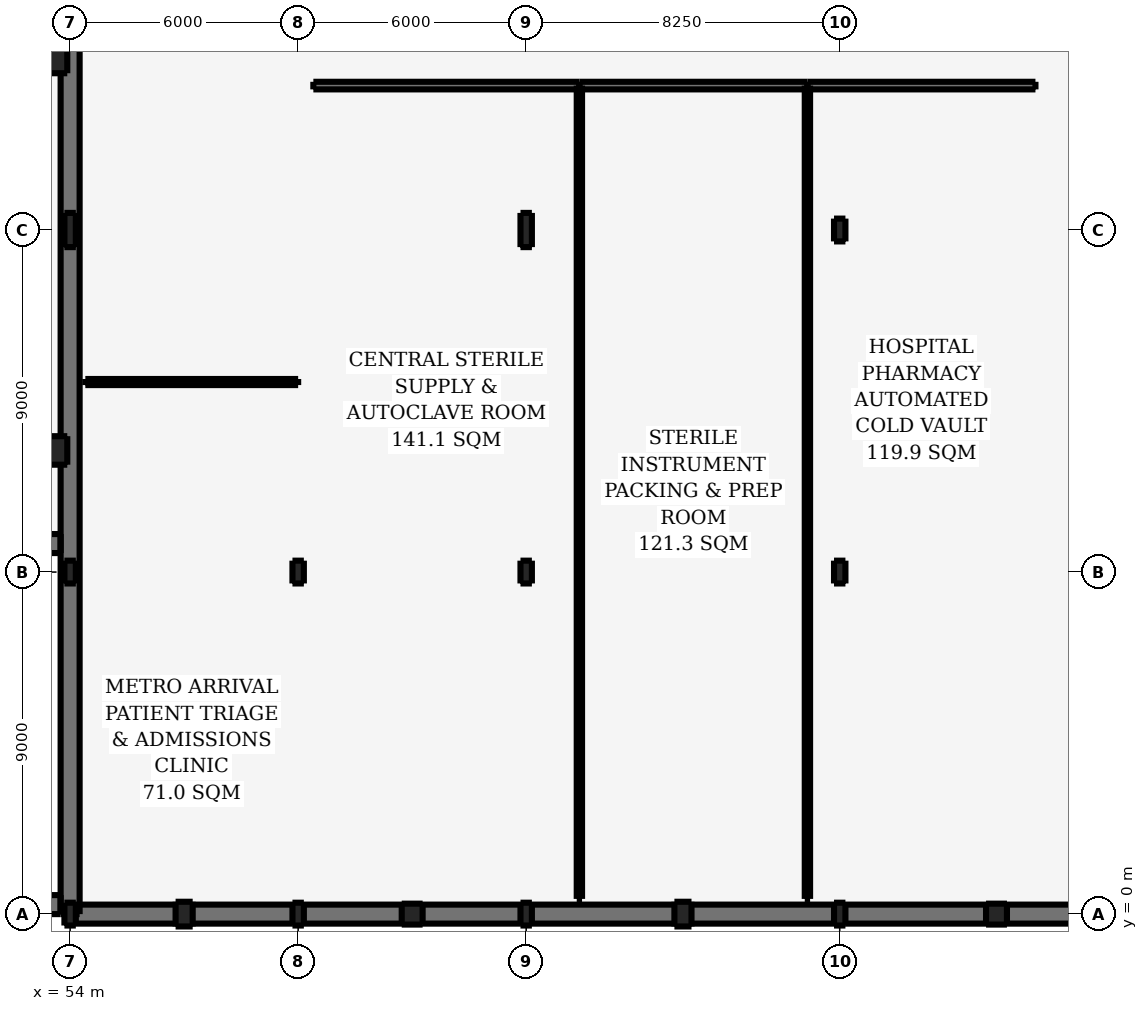
"""IFC4 building model, lengths in metres.
Left out: names, types, materials, properties, quantities, classifications, styles, units other than length and angle.
Written with IfcOpenShell. Run it as: python <this file> out.ifc"""

import sys

from ifc_helpers import new_model, si_unit, direction, frame, frame_2d, origin, origin_2d, place, context, subcontext, project, spatial, rectangle, i_section, extrude, element, fill, save


model = new_model("IFC4")
c1 = context("Model", 3, precision=1e-05, world=origin(), true_north=direction((0.0, 1.0)))
c2 = subcontext(c1, "Body", "Model", "MODEL_VIEW")
j1 = project(units=[si_unit("LENGTHUNIT", "METRE"), si_unit("PLANEANGLEUNIT", "RADIAN")], contexts=[c1])
p1 = place(None, origin())
s1 = spatial("IfcSite", under=j1, at=p1, CompositionType="ELEMENT")
p2 = place(p1, origin())
s2 = spatial("IfcBuilding", under=s1, at=p2, CompositionType="ELEMENT")
p3 = place(p2, frame((0.0, 0.0, -4.8)))
s3 = spatial("IfcBuildingStorey", under=s2, at=p3, CompositionType="ELEMENT", Elevation=-4.8)
for number, where, z_axis, x_axis in (
    (1, (53.55, 12.2, 0.0), (0.0, 0.0, 1.0), (1.0, 0.0, 0.0)),
    (2, (53.55, 22.5, 0.0), (0.0, 0.0, 1.0), (1.0, 0.0, 0.0)),
):
    element("IfcColumn", number, at=place(p3, frame(where, z_axis=z_axis, x_axis=x_axis)), inside=s3, PredefinedType="PILASTER", context=c2, shape_type="SweptSolid", body=[
        extrude(rectangle(XDim=0.75, YDim=0.75, at=origin_2d()), origin(), (0.0, 0.0, 1.0), 4.8),
    ])
for number, where, z_axis, x_axis in (
    (3, (54.0, 0.0, 0.0), (0.0, 0.0, 1.0), (1.0, 0.0, 0.0)),
    (4, (54.0, 9.0, 0.0), (0.0, 0.0, 1.0), (1.0, 0.0, 0.0)),
):
    element("IfcColumn", number, at=place(p3, frame(where, z_axis=z_axis, x_axis=x_axis)), inside=s3, PredefinedType="COLUMN", context=c2, shape_type="SweptSolid", body=[
        extrude(i_section(OverallWidth=0.3, OverallDepth=0.6, WebThickness=0.015, FlangeThickness=0.03, FilletRadius=0.027, at=origin_2d()), origin(), (0.0, 0.0, 1.0), 4.8),
    ])
p4 = place(p3, frame((54.0, 18.0, 0.0), z_axis=(0.0, 0.0, 1.0), x_axis=(1.0, 0.0, 0.0)))
e5 = element("IfcColumn", 5, at=p4, inside=s3, PredefinedType="COLUMN", context=c2, shape_type="SweptSolid", body=[
    extrude(i_section(OverallWidth=0.3, OverallDepth=0.9, WebThickness=0.019, FlangeThickness=0.035, FilletRadius=0.03, at=origin_2d()), origin(), (0.0, 0.0, 1.0), 4.8),
])
p5 = place(p3, frame((57.0, 0.0, 0.0), z_axis=(0.0, 0.0, 1.0), x_axis=(1.0, 0.0, 0.0)))
e6 = element("IfcColumn", 6, at=p5, inside=s3, PredefinedType="PILASTER", context=c2, shape_type="SweptSolid", body=[
    extrude(rectangle(XDim=0.45, YDim=0.65, at=origin_2d()), origin(), (0.0, 0.0, 1.0), 4.8),
])
for number, where, z_axis, x_axis in (
    (7, (60.0, 0.0, 0.0), (0.0, 0.0, 1.0), (1.0, 0.0, 0.0)),
    (8, (60.0, 9.0, 0.0), (0.0, 0.0, 1.0), (1.0, 0.0, 0.0)),
):
    element("IfcColumn", number, at=place(p3, frame(where, z_axis=z_axis, x_axis=x_axis)), inside=s3, PredefinedType="COLUMN", context=c2, shape_type="SweptSolid", body=[
        extrude(i_section(OverallWidth=0.3, OverallDepth=0.6, WebThickness=0.015, FlangeThickness=0.03, FilletRadius=0.027, at=origin_2d()), origin(), (0.0, 0.0, 1.0), 4.8),
    ])
p6 = place(p3, frame((63.0, 0.0, 0.0), z_axis=(0.0, 0.0, 1.0), x_axis=(1.0, 0.0, 0.0)))
e9 = element("IfcColumn", 9, at=p6, inside=s3, PredefinedType="PILASTER", context=c2, shape_type="SweptSolid", body=[
    extrude(rectangle(XDim=0.55, YDim=0.55, at=origin_2d()), origin(), (0.0, 0.0, 1.0), 4.8),
])
for number, where, z_axis, x_axis in (
    (10, (66.0, 0.0, 0.0), (0.0, 0.0, 1.0), (1.0, 0.0, 0.0)),
    (11, (66.0, 9.0, 0.0), (0.0, 0.0, 1.0), (1.0, 0.0, 0.0)),
):
    element("IfcColumn", number, at=place(p3, frame(where, z_axis=z_axis, x_axis=x_axis)), inside=s3, PredefinedType="COLUMN", context=c2, shape_type="SweptSolid", body=[
        extrude(i_section(OverallWidth=0.3, OverallDepth=0.6, WebThickness=0.015, FlangeThickness=0.03, FilletRadius=0.027, at=origin_2d()), origin(), (0.0, 0.0, 1.0), 4.8),
    ])
p7 = place(p3, frame((66.0, 18.0, 0.0), z_axis=(0.0, 0.0, 1.0), x_axis=(1.0, 0.0, 0.0)))
e12 = element("IfcColumn", 12, at=p7, inside=s3, PredefinedType="COLUMN", context=c2, shape_type="SweptSolid", body=[
    extrude(i_section(OverallWidth=0.3, OverallDepth=0.9, WebThickness=0.019, FlangeThickness=0.035, FilletRadius=0.03, at=origin_2d()), origin(), (0.0, 0.0, 1.0), 4.8),
])
p8 = place(p3, frame((70.125, 0.0, 0.0), z_axis=(0.0, 0.0, 1.0), x_axis=(1.0, 0.0, 0.0)))
e13 = element("IfcColumn", 13, at=p8, inside=s3, PredefinedType="PILASTER", context=c2, shape_type="SweptSolid", body=[
    extrude(rectangle(XDim=0.45, YDim=0.65, at=origin_2d()), origin(), (0.0, 0.0, 1.0), 4.8),
])
for number, where, z_axis, x_axis in (
    (14, (74.25, 0.0, 0.0), (0.0, 0.0, 1.0), (1.0, 0.0, 0.0)),
    (15, (74.25, 9.0, 0.0), (0.0, 0.0, 1.0), (1.0, 0.0, 0.0)),
    (16, (74.25, 18.0, 0.0), (0.0, 0.0, 1.0), (1.0, 0.0, 0.0)),
):
    element("IfcColumn", number, at=place(p3, frame(where, z_axis=z_axis, x_axis=x_axis)), inside=s3, PredefinedType="COLUMN", context=c2, shape_type="SweptSolid", body=[
        extrude(i_section(OverallWidth=0.3, OverallDepth=0.6, WebThickness=0.015, FlangeThickness=0.03, FilletRadius=0.027, at=origin_2d()), origin(), (0.0, 0.0, 1.0), 4.8),
    ])
p9 = place(p3, frame((78.375, 0.0, 0.0), z_axis=(0.0, 0.0, 1.0), x_axis=(1.0, 0.0, 0.0)))
e17 = element("IfcColumn", 17, at=p9, inside=s3, PredefinedType="PILASTER", context=c2, shape_type="SweptSolid", body=[
    extrude(rectangle(XDim=0.55, YDim=0.55, at=origin_2d()), origin(), (0.0, 0.0, 1.0), 4.8),
])
p10 = place(p3, frame((54.0, 0.0, 0.0), z_axis=(0.0, 0.0, 1.0), x_axis=(0.0, 1.0, 0.0)))
e18 = element("IfcWall", 18, at=p10, inside=s3, PredefinedType="SOLIDWALL", context=c2, shape_type="SweptSolid", body=[
    extrude(rectangle(XDim=36.0, YDim=0.5, at=frame_2d((18.0, 0.0))), origin(), (0.0, 0.0, 1.0), 4.5),
])
p11 = place(p10, frame((23.5, 0.0, 0.0)))
e19 = element("IfcOpeningElement", 19, at=p11, cuts=e18, PredefinedType="OPENING", context=c2, shape_type="SweptSolid", body=[
    extrude(rectangle(XDim=2.6, YDim=2.6, at=frame_2d((1.3, 1.3))), frame((0.0, 0.26, 0.0), z_axis=(0.0, -1.0, 0.0), x_axis=(1.0, 0.0, 0.0)), (0.0, 0.0, 1.0), 0.52),
])
p12 = place(p3, frame((99.0, 0.0, 0.0), z_axis=(0.0, 0.0, 1.0), x_axis=(-1.0, 0.0, 0.0)))
e20 = element("IfcWall", 20, at=p12, inside=s3, PredefinedType="SOLIDWALL", context=c2, shape_type="SweptSolid", body=[
    extrude(rectangle(XDim=45.0, YDim=0.5, at=frame_2d((22.5, 0.0))), origin(), (0.0, 0.0, 1.0), 4.5),
])
p13 = place(p3, frame((0.0, 0.25, 0.0), z_axis=(0.0, 0.0, 1.0), x_axis=(1.0, 0.0, 0.0)))
e21 = element("IfcWall", 21, at=p13, inside=s3, PredefinedType="SOLIDWALL", context=c2, shape_type="SweptSolid", body=[
    extrude(rectangle(XDim=53.75, YDim=0.5, at=frame_2d((26.875, 0.0))), origin(), (0.0, 0.0, 1.0), 4.5),
])
p14 = place(p3, frame((13.5, 9.75, 0.0), z_axis=(0.0, 0.0, 1.0), x_axis=(1.0, 0.0, 0.0)))
e22 = element("IfcWall", 22, at=p14, inside=s3, PredefinedType="SOLIDWALL", context=c2, shape_type="SweptSolid", body=[
    extrude(rectangle(XDim=40.25, YDim=0.5, at=frame_2d((20.125, 0.0))), origin(), (0.0, 0.0, 1.0), 4.5),
])
p15 = place(p3, frame((54.4, 14.0, 0.0), z_axis=(0.0, 0.0, 1.0), x_axis=(1.0, 0.0, 0.0)))
e23 = element("IfcWall", 23, at=p15, inside=s3, PredefinedType="PARTITIONING", context=c2, shape_type="SweptSolid", body=[
    extrude(rectangle(XDim=5.6, YDim=0.16, at=frame_2d((2.8, 0.0))), origin(), (0.0, 0.0, 1.0), 4.5),
])
p16 = place(p15, frame((2.2, 0.0, 0.0)))
e24 = element("IfcOpeningElement", 24, at=p16, cuts=e23, PredefinedType="OPENING", context=c2, shape_type="SweptSolid", body=[
    extrude(rectangle(XDim=1.2, YDim=2.2, at=frame_2d((0.6, 1.1))), frame((0.0, 0.09, 0.0), z_axis=(0.0, -1.0, 0.0), x_axis=(1.0, 0.0, 0.0)), (0.0, 0.0, 1.0), 0.18),
])
p17 = place(p3, frame((60.4, 21.8, 0.0), z_axis=(0.0, 0.0, 1.0), x_axis=(1.0, 0.0, 0.0)))
e25 = element("IfcWall", 25, at=p17, inside=s3, PredefinedType="PARTITIONING", context=c2, shape_type="SweptSolid", body=[
    extrude(rectangle(XDim=7.0, YDim=0.2, at=frame_2d((3.5, 0.0))), origin(), (0.0, 0.0, 1.0), 4.5),
])
p18 = place(p17, frame((2.8, 0.0, 0.0)))
e26 = element("IfcOpeningElement", 26, at=p18, cuts=e25, PredefinedType="OPENING", context=c2, shape_type="SweptSolid", body=[
    extrude(rectangle(XDim=1.4, YDim=2.2, at=frame_2d((0.7, 1.1))), frame((0.0, 0.11, 0.0), z_axis=(0.0, -1.0, 0.0), x_axis=(1.0, 0.0, 0.0)), (0.0, 0.0, 1.0), 0.22),
])
p19 = place(p3, frame((67.4, 0.4, 0.0), z_axis=(0.0, 0.0, 1.0), x_axis=(0.0, 1.0, 0.0)))
e27 = element("IfcWall", 27, at=p19, inside=s3, PredefinedType="PARTITIONING", context=c2, shape_type="SweptSolid", body=[
    extrude(rectangle(XDim=21.4, YDim=0.14, at=frame_2d((10.7, 0.0))), origin(), (0.0, 0.0, 1.0), 4.5),
])
p20 = place(p3, frame((67.4, 21.8, 0.0), z_axis=(0.0, 0.0, 1.0), x_axis=(1.0, 0.0, 0.0)))
e28 = element("IfcWall", 28, at=p20, inside=s3, PredefinedType="PARTITIONING", context=c2, shape_type="SweptSolid", body=[
    extrude(rectangle(XDim=6.0, YDim=0.2, at=frame_2d((3.0, 0.0))), origin(), (0.0, 0.0, 1.0), 4.5),
])
p21 = place(p20, frame((2.3, 0.0, 0.0)))
e29 = element("IfcOpeningElement", 29, at=p21, cuts=e28, PredefinedType="OPENING", context=c2, shape_type="SweptSolid", body=[
    extrude(rectangle(XDim=1.4, YDim=2.2, at=frame_2d((0.7, 1.1))), frame((0.0, 0.11, 0.0), z_axis=(0.0, -1.0, 0.0), x_axis=(1.0, 0.0, 0.0)), (0.0, 0.0, 1.0), 0.22),
])
p22 = place(p3, frame((73.4, 0.4, 0.0), z_axis=(0.0, 0.0, 1.0), x_axis=(0.0, 1.0, 0.0)))
e30 = element("IfcWall", 30, at=p22, inside=s3, PredefinedType="PARTITIONING", context=c2, shape_type="SweptSolid", body=[
    extrude(rectangle(XDim=21.4, YDim=0.14, at=frame_2d((10.7, 0.0))), origin(), (0.0, 0.0, 1.0), 4.5),
])
p23 = place(p3, frame((73.4, 21.8, 0.0), z_axis=(0.0, 0.0, 1.0), x_axis=(1.0, 0.0, 0.0)))
e31 = element("IfcWall", 31, at=p23, inside=s3, PredefinedType="PARTITIONING", context=c2, shape_type="SweptSolid", body=[
    extrude(rectangle(XDim=6.0, YDim=0.2, at=frame_2d((3.0, 0.0))), origin(), (0.0, 0.0, 1.0), 4.5),
])
p24 = place(p23, frame((2.4, 0.0, 0.0)))
e32 = element("IfcOpeningElement", 32, at=p24, cuts=e31, PredefinedType="OPENING", context=c2, shape_type="SweptSolid", body=[
    extrude(rectangle(XDim=1.2, YDim=2.2, at=frame_2d((0.6, 1.1))), frame((0.0, 0.11, 0.0), z_axis=(0.0, -1.0, 0.0), x_axis=(1.0, 0.0, 0.0)), (0.0, 0.0, 1.0), 0.22),
])
p25 = place(p16, origin())
e33 = element("IfcDoor", 33, at=p25, inside=s3, OperationType="SINGLE_SWING_LEFT", PredefinedType="DOOR", context=c2, shape_type="SweptSolid", body=[
    extrude(rectangle(XDim=1.2, YDim=2.2, at=frame_2d((0.6, 1.1))), frame((0.0, 0.025, 0.0), z_axis=(0.0, -1.0, 0.0), x_axis=(1.0, 0.0, 0.0)), (0.0, 0.0, 1.0), 0.05),
])
fill(e24, e33)
p26 = place(p18, origin())
e34 = element("IfcDoor", 34, at=p26, inside=s3, OperationType="SINGLE_SWING_RIGHT", PredefinedType="DOOR", context=c2, shape_type="SweptSolid", body=[
    extrude(rectangle(XDim=1.4, YDim=2.2, at=frame_2d((0.7, 1.1))), frame((0.0, 0.025, 0.0), z_axis=(0.0, -1.0, 0.0), x_axis=(1.0, 0.0, 0.0)), (0.0, 0.0, 1.0), 0.05),
])
fill(e26, e34)
p27 = place(p21, origin())
e35 = element("IfcDoor", 35, at=p27, inside=s3, OperationType="SINGLE_SWING_LEFT", PredefinedType="DOOR", context=c2, shape_type="SweptSolid", body=[
    extrude(rectangle(XDim=1.4, YDim=2.2, at=frame_2d((0.7, 1.1))), frame((0.0, 0.025, 0.0), z_axis=(0.0, -1.0, 0.0), x_axis=(1.0, 0.0, 0.0)), (0.0, 0.0, 1.0), 0.05),
])
fill(e29, e35)
p28 = place(p24, origin())
e36 = element("IfcDoor", 36, at=p28, inside=s3, OperationType="SINGLE_SWING_RIGHT", PredefinedType="DOOR", context=c2, shape_type="SweptSolid", body=[
    extrude(rectangle(XDim=1.2, YDim=2.2, at=frame_2d((0.6, 1.1))), frame((0.0, 0.025, 0.0), z_axis=(0.0, -1.0, 0.0), x_axis=(1.0, 0.0, 0.0)), (0.0, 0.0, 1.0), 0.05),
])
fill(e32, e36)
save(model, sys.argv[1])
